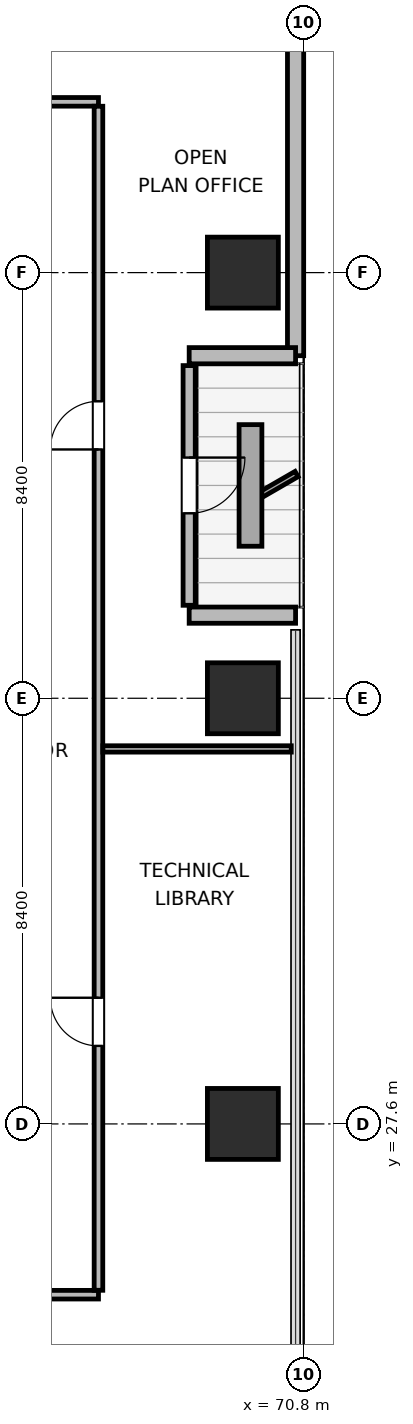
"""IFC4 building model, lengths in metres.
Left out: names, types, materials, properties, quantities, classifications, styles, units other than length and angle.
Written with IfcOpenShell. Run it as: python <this file> out.ifc"""

import sys

from ifc_helpers import new_model, si_unit, direction, frame, frame_2d, origin, origin_2d, place, context, subcontext, project, spatial, rectangle, extrude, element, fill, save


model = new_model("IFC4")
c1 = context("Model", 3, precision=1e-05, world=origin(), true_north=direction((0.0, 1.0)))
c2 = subcontext(c1, "Body", "Model", "MODEL_VIEW")
j1 = project(units=[si_unit("LENGTHUNIT", "METRE"), si_unit("PLANEANGLEUNIT", "RADIAN")], contexts=[c1])
p1 = place(None, origin())
s1 = spatial("IfcSite", under=j1, at=p1, CompositionType="ELEMENT")
p2 = place(p1, origin())
s2 = spatial("IfcBuilding", under=s1, at=p2, CompositionType="ELEMENT")
p3 = place(p2, frame((0.0, 0.0, 93.6)))
s3 = spatial("IfcBuildingStorey", under=s2, at=p3, CompositionType="ELEMENT", Elevation=93.6)
for number, where, z_axis, x_axis in (
    (1, (69.6, 27.6, 0.0), (0.0, 0.0, 1.0), (1.0, 0.0, 0.0)),
    (2, (69.6, 36.0, 0.0), (0.0, 0.0, 1.0), (1.0, 0.0, 0.0)),
    (3, (69.6, 44.4, 0.0), (0.0, 0.0, 1.0), (1.0, 0.0, 0.0)),
):
    element("IfcColumn", number, at=place(p3, frame(where, z_axis=z_axis, x_axis=x_axis)), inside=s3, PredefinedType="COLUMN", context=c2, shape_type="SweptSolid", body=[
        extrude(rectangle(XDim=1.4, YDim=1.4, at=origin_2d()), origin(), (0.0, 0.0, 1.0), 3.9),
    ])
p4 = place(p3, frame((70.64, 56.979, 0.0), z_axis=(0.0, 0.0, 1.0), x_axis=(0.0, -1.0, 0.0)))
e4 = element("IfcWall", 4, at=p4, inside=s3, PredefinedType="SOLIDWALL", context=c2, shape_type="SweptSolid", body=[
    extrude(rectangle(XDim=14.219, YDim=0.32, at=frame_2d((7.109, 0.0))), origin(), (0.0, 0.0, 1.0), 3.64),
])
p5 = place(p3, frame((70.64, 42.76, 0.0), z_axis=(0.0, 0.0, 1.0), x_axis=(-1.0, 0.0, 0.0)))
e5 = element("IfcWall", 5, at=p5, inside=s3, PredefinedType="SOLIDWALL", context=c2, shape_type="SweptSolid", body=[
    extrude(rectangle(XDim=2.1, YDim=0.32, at=frame_2d((1.05, 0.0))), origin(), (0.0, 0.0, 1.0), 2.875),
])
p6 = place(p3, frame((68.54, 42.565, 0.0), z_axis=(0.0, 0.0, 1.0), x_axis=(0.0, -1.0, 0.0)))
e6 = element("IfcWall", 6, at=p6, inside=s3, PredefinedType="SOLIDWALL", context=c2, shape_type="SweptSolid", body=[
    extrude(rectangle(XDim=4.73, YDim=0.24, at=frame_2d((2.365, 0.0))), origin(), (0.0, 0.0, 1.0), 3.162),
])
p7 = place(p6, frame((1.815, 0.0, 0.0)))
e7 = element("IfcOpeningElement", 7, at=p7, cuts=e6, PredefinedType="OPENING", context=c2, shape_type="SweptSolid", body=[
    extrude(rectangle(XDim=1.1, YDim=2.04, at=frame_2d((0.55, 1.02))), frame((0.0, 0.13, 0.0), z_axis=(0.0, -1.0, 0.0), x_axis=(1.0, 0.0, 0.0)), (0.0, 0.0, 1.0), 0.26),
])
p8 = place(p3, frame((68.54, 37.64, 0.0), z_axis=(0.0, 0.0, 1.0), x_axis=(1.0, 0.0, 0.0)))
e8 = element("IfcWall", 8, at=p8, inside=s3, PredefinedType="SOLIDWALL", context=c2, shape_type="SweptSolid", body=[
    extrude(rectangle(XDim=2.1, YDim=0.32, at=frame_2d((1.05, 0.0))), origin(), (0.0, 0.0, 1.0), 2.875),
])
p9 = place(p3, frame((29.25, 24.23, 0.0), z_axis=(0.0, 0.0, 1.0), x_axis=(1.0, 0.0, 0.0)))
e9 = element("IfcWall", 9, at=p9, inside=s3, PredefinedType="PARTITIONING", context=c2, shape_type="SweptSolid", body=[
    extrude(rectangle(XDim=37.5, YDim=0.17, at=frame_2d((18.75, 0.0))), origin(), (0.0, 0.0, 1.0), 3.64),
])
p10 = place(p9, frame((4.51, 0.0, 0.0)))
e10 = element("IfcOpeningElement", 10, at=p10, cuts=e9, PredefinedType="OPENING", context=c2, shape_type="SweptSolid", body=[
    extrude(rectangle(XDim=0.95, YDim=2.04, at=frame_2d((0.475, 1.02))), frame((0.0, 0.095, 0.0), z_axis=(0.0, -1.0, 0.0), x_axis=(1.0, 0.0, 0.0)), (0.0, 0.0, 1.0), 0.19),
])
p11 = place(p9, frame((13.885, 0.0, 0.0)))
e11 = element("IfcOpeningElement", 11, at=p11, cuts=e9, PredefinedType="OPENING", context=c2, shape_type="SweptSolid", body=[
    extrude(rectangle(XDim=0.95, YDim=2.04, at=frame_2d((0.475, 1.02))), frame((0.0, 0.095, 0.0), z_axis=(0.0, -1.0, 0.0), x_axis=(1.0, 0.0, 0.0)), (0.0, 0.0, 1.0), 0.19),
])
p12 = place(p9, frame((22.66, 0.0, 0.0)))
e12 = element("IfcOpeningElement", 12, at=p12, cuts=e9, PredefinedType="OPENING", context=c2, shape_type="SweptSolid", body=[
    extrude(rectangle(XDim=0.95, YDim=2.04, at=frame_2d((0.475, 1.02))), frame((0.0, 0.095, 0.0), z_axis=(0.0, -1.0, 0.0), x_axis=(1.0, 0.0, 0.0)), (0.0, 0.0, 1.0), 0.19),
])
p13 = place(p9, frame((32.035, 0.0, 0.0)))
e13 = element("IfcOpeningElement", 13, at=p13, cuts=e9, PredefinedType="OPENING", context=c2, shape_type="SweptSolid", body=[
    extrude(rectangle(XDim=0.95, YDim=2.04, at=frame_2d((0.475, 1.02))), frame((0.0, 0.095, 0.0), z_axis=(0.0, -1.0, 0.0), x_axis=(1.0, 0.0, 0.0)), (0.0, 0.0, 1.0), 0.19),
])
p14 = place(p3, frame((29.25, 47.77, 0.0), z_axis=(0.0, 0.0, 1.0), x_axis=(1.0, 0.0, 0.0)))
e14 = element("IfcWall", 14, at=p14, inside=s3, PredefinedType="PARTITIONING", context=c2, shape_type="SweptSolid", body=[
    extrude(rectangle(XDim=37.5, YDim=0.17, at=frame_2d((18.75, 0.0))), origin(), (0.0, 0.0, 1.0), 3.64),
])
p15 = place(p14, frame((4.005, 0.0, 0.0)))
e15 = element("IfcOpeningElement", 15, at=p15, cuts=e14, PredefinedType="OPENING", context=c2, shape_type="SweptSolid", body=[
    extrude(rectangle(XDim=0.95, YDim=2.04, at=frame_2d((0.475, 1.02))), frame((0.0, 0.095, 0.0), z_axis=(0.0, -1.0, 0.0), x_axis=(1.0, 0.0, 0.0)), (0.0, 0.0, 1.0), 0.19),
])
p16 = place(p14, frame((10.07, 0.0, 0.0)))
e16 = element("IfcOpeningElement", 16, at=p16, cuts=e14, PredefinedType="OPENING", context=c2, shape_type="SweptSolid", body=[
    extrude(rectangle(XDim=0.95, YDim=2.04, at=frame_2d((0.475, 1.02))), frame((0.0, 0.095, 0.0), z_axis=(0.0, -1.0, 0.0), x_axis=(1.0, 0.0, 0.0)), (0.0, 0.0, 1.0), 0.19),
])
p17 = place(p14, frame((17.165, 0.0, 0.0)))
e17 = element("IfcOpeningElement", 17, at=p17, cuts=e14, PredefinedType="OPENING", context=c2, shape_type="SweptSolid", body=[
    extrude(rectangle(XDim=0.95, YDim=2.04, at=frame_2d((0.475, 1.02))), frame((0.0, 0.095, 0.0), z_axis=(0.0, -1.0, 0.0), x_axis=(1.0, 0.0, 0.0)), (0.0, 0.0, 1.0), 0.19),
])
p18 = place(p14, frame((25.37, 0.0, 0.0)))
e18 = element("IfcOpeningElement", 18, at=p18, cuts=e14, PredefinedType="OPENING", context=c2, shape_type="SweptSolid", body=[
    extrude(rectangle(XDim=0.95, YDim=2.04, at=frame_2d((0.475, 1.02))), frame((0.0, 0.095, 0.0), z_axis=(0.0, -1.0, 0.0), x_axis=(1.0, 0.0, 0.0)), (0.0, 0.0, 1.0), 0.19),
])
p19 = place(p14, frame((32.545, 0.0, 0.0)))
e19 = element("IfcOpeningElement", 19, at=p19, cuts=e14, PredefinedType="OPENING", context=c2, shape_type="SweptSolid", body=[
    extrude(rectangle(XDim=0.95, YDim=2.04, at=frame_2d((0.475, 1.02))), frame((0.0, 0.095, 0.0), z_axis=(0.0, -1.0, 0.0), x_axis=(1.0, 0.0, 0.0)), (0.0, 0.0, 1.0), 0.19),
])
p20 = place(p3, frame((66.75, 24.317, 0.0), z_axis=(0.0, 0.0, 1.0), x_axis=(0.0, 1.0, 0.0)))
e20 = element("IfcWall", 20, at=p20, inside=s3, PredefinedType="PARTITIONING", context=c2, shape_type="SweptSolid", body=[
    extrude(rectangle(XDim=23.366, YDim=0.17, at=frame_2d((11.683, 0.0))), origin(), (0.0, 0.0, 1.0), 3.64),
])
p21 = place(p20, frame((4.823, 0.0, 0.0)))
e21 = element("IfcOpeningElement", 21, at=p21, cuts=e20, PredefinedType="OPENING", context=c2, shape_type="SweptSolid", body=[
    extrude(rectangle(XDim=0.95, YDim=2.04, at=frame_2d((0.475, 1.02))), frame((0.0, 0.095, 0.0), z_axis=(0.0, -1.0, 0.0), x_axis=(1.0, 0.0, 0.0)), (0.0, 0.0, 1.0), 0.19),
])
p22 = place(p20, frame((16.593, 0.0, 0.0)))
e22 = element("IfcOpeningElement", 22, at=p22, cuts=e20, PredefinedType="OPENING", context=c2, shape_type="SweptSolid", body=[
    extrude(rectangle(XDim=0.95, YDim=2.04, at=frame_2d((0.475, 1.02))), frame((0.0, 0.095, 0.0), z_axis=(0.0, -1.0, 0.0), x_axis=(1.0, 0.0, 0.0)), (0.0, 0.0, 1.0), 0.19),
])
p23 = place(p3, frame((66.837, 35.0, 0.0), z_axis=(0.0, 0.0, 1.0), x_axis=(1.0, 0.0, 0.0)))
e23 = element("IfcWall", 23, at=p23, inside=s3, PredefinedType="PARTITIONING", context=c2, shape_type="SweptSolid", body=[
    extrude(rectangle(XDim=3.718, YDim=0.125, at=frame_2d((1.859, 0.0))), origin(), (0.0, 0.0, 1.0), 3.64),
])
p24 = place(p7, origin())
e24 = element("IfcDoor", 24, at=p24, inside=s3, OperationType="SINGLE_SWING_LEFT", PredefinedType="DOOR", context=c2, shape_type="SweptSolid", body=[
    extrude(rectangle(XDim=1.1, YDim=2.04, at=frame_2d((0.55, 1.02))), frame((0.0, 0.025, 0.0), z_axis=(0.0, -1.0, 0.0), x_axis=(1.0, 0.0, 0.0)), (0.0, 0.0, 1.0), 0.05),
])
fill(e7, e24)
p25 = place(p21, origin())
e25 = element("IfcDoor", 25, at=p25, inside=s3, OperationType="SINGLE_SWING_RIGHT", PredefinedType="DOOR", context=c2, shape_type="SweptSolid", body=[
    extrude(rectangle(XDim=0.95, YDim=2.04, at=frame_2d((0.475, 1.02))), frame((0.0, 0.025, 0.0), z_axis=(0.0, -1.0, 0.0), x_axis=(1.0, 0.0, 0.0)), (0.0, 0.0, 1.0), 0.05),
])
fill(e21, e25)
p26 = place(p22, origin())
e26 = element("IfcDoor", 26, at=p26, inside=s3, OperationType="SINGLE_SWING_LEFT", PredefinedType="DOOR", context=c2, shape_type="SweptSolid", body=[
    extrude(rectangle(XDim=0.95, YDim=2.04, at=frame_2d((0.475, 1.02))), frame((0.0, 0.025, 0.0), z_axis=(0.0, -1.0, 0.0), x_axis=(1.0, 0.0, 0.0)), (0.0, 0.0, 1.0), 0.05),
])
fill(e22, e26)
save(model, sys.argv[1])
